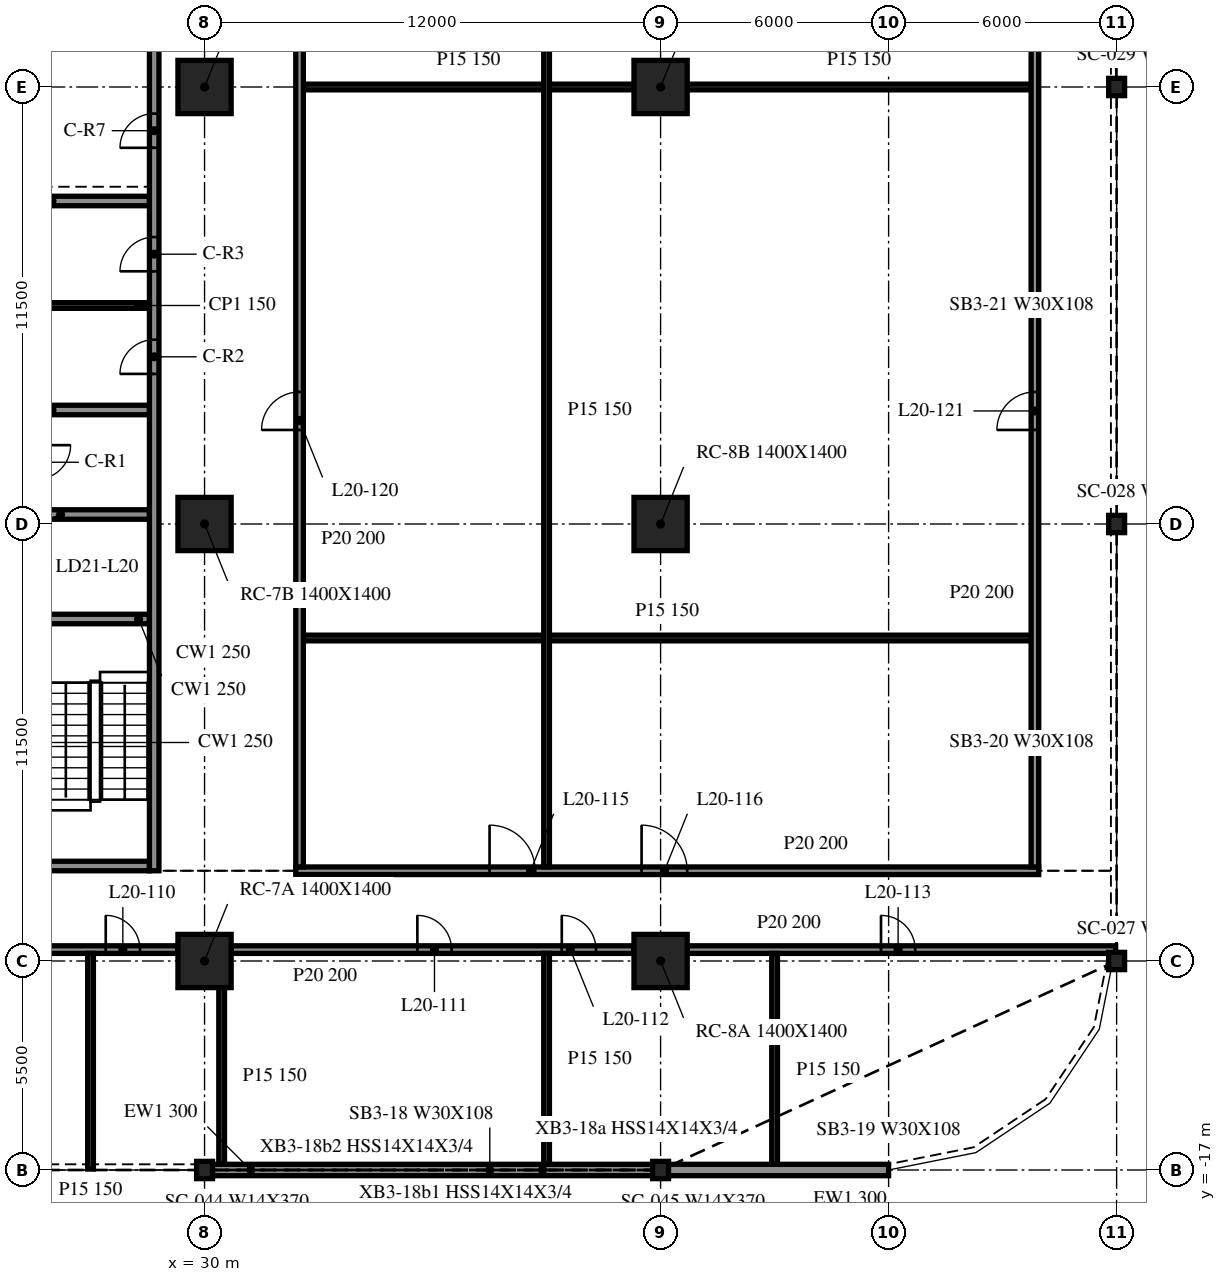
"""IFC4 building model, lengths in metres.
Left out: names, types, materials, properties, quantities, classifications, styles, units other than length and angle.
Written with IfcOpenShell. Run it as: python <this file> out.ifc"""

import sys

from ifc_helpers import new_model, si_unit, direction, frame, frame_2d, origin, origin_2d, place, context, subcontext, project, spatial, rectangle, i_section, extrude, element, fill, save


model = new_model("IFC4")
c1 = context("Model", 3, precision=1e-05, world=origin(), true_north=direction((0.0, 1.0)))
c2 = subcontext(c1, "Body", "Model", "MODEL_VIEW")
j1 = project(units=[si_unit("LENGTHUNIT", "METRE"), si_unit("PLANEANGLEUNIT", "RADIAN")], contexts=[c1])
p1 = place(None, origin())
s1 = spatial("IfcSite", under=j1, at=p1, CompositionType="ELEMENT")
p2 = place(p1, origin())
s2 = spatial("IfcBuilding", under=s1, at=p2, CompositionType="ELEMENT")
p3 = place(p2, frame((0.0, 0.0, 88.9)))
s3 = spatial("IfcBuildingStorey", under=s2, at=p3, CompositionType="ELEMENT", Elevation=88.9)
for number, where, z_axis, x_axis in (
    (1, (30.0, -11.5, -0.34), (0.0, 0.0, 1.0), (1.0, 0.0, 0.0)),
    (2, (30.0, 0.0, -0.34), (0.0, 0.0, 1.0), (1.0, 0.0, 0.0)),
    (3, (30.0, 11.5, -0.34), (0.0, 0.0, 1.0), (1.0, 0.0, 0.0)),
    (4, (42.0, -11.5, -0.34), (0.0, 0.0, 1.0), (1.0, 0.0, 0.0)),
    (5, (42.0, 0.0, -0.34), (0.0, 0.0, 1.0), (1.0, 0.0, 0.0)),
    (6, (42.0, 11.5, -0.34), (0.0, 0.0, 1.0), (1.0, 0.0, 0.0)),
):
    element("IfcColumn", number, at=place(p3, frame(where, z_axis=z_axis, x_axis=x_axis)), inside=s3, PredefinedType="COLUMN", context=c2, shape_type="SweptSolid", body=[
        extrude(rectangle(XDim=1.4, YDim=1.4, at=origin_2d()), origin(), (0.0, 0.0, 1.0), 4.1),
    ])
for number, where, z_axis, x_axis in (
    (7, (30.0, -17.0, -0.34), (0.0, 0.0, 1.0), (1.0, 0.0, 0.0)),
    (8, (42.0, -17.0, -0.34), (0.0, 0.0, 1.0), (1.0, 0.0, 0.0)),
    (9, (54.0, -11.5, -0.34), (0.0, 0.0, 1.0), (1.0, 0.0, 0.0)),
    (10, (54.0, 0.0, -0.34), (0.0, 0.0, 1.0), (1.0, 0.0, 0.0)),
    (11, (54.0, 11.5, -0.34), (0.0, 0.0, 1.0), (1.0, 0.0, 0.0)),
):
    element("IfcColumn", number, at=place(p3, frame(where, z_axis=z_axis, x_axis=x_axis)), inside=s3, PredefinedType="COLUMN", context=c2, shape_type="SweptSolid", body=[
        extrude(i_section(OverallWidth=0.419, OverallDepth=0.455, WebThickness=0.042, FlangeThickness=0.068, at=origin_2d()), origin(), (0.0, 0.0, 1.0), 4.1),
    ])
p4 = place(p3, frame((30.021, -17.0, 0.0), z_axis=(0.0, 0.0, 1.0), x_axis=(1.0, 0.0, 0.0)))
e12 = element("IfcWall", 12, at=p4, inside=s3, PredefinedType="NOTDEFINED", context=c2, shape_type="SweptSolid", body=[
    extrude(rectangle(XDim=11.958, YDim=0.3, at=frame_2d((5.979, 0.0))), origin(), (0.0, 0.0, 1.0), 3.003),
])
p5 = place(p3, frame((42.021, -17.0, 0.0), z_axis=(0.0, 0.0, 1.0), x_axis=(1.0, 0.0, 0.0)))
e13 = element("IfcWall", 13, at=p5, inside=s3, PredefinedType="NOTDEFINED", context=c2, shape_type="SweptSolid", body=[
    extrude(rectangle(XDim=5.979, YDim=0.3, at=frame_2d((2.99, 0.0))), origin(), (0.0, 0.0, 1.0), 3.003),
])
p6 = place(p3, frame((28.675, -9.125, 0.0), z_axis=(0.0, 0.0, 1.0), x_axis=(0.0, 1.0, 0.0)))
e14 = element("IfcWall", 14, at=p6, inside=s3, PredefinedType="SOLIDWALL", context=c2, shape_type="SweptSolid", body=[
    extrude(rectangle(XDim=24.25, YDim=0.25, at=frame_2d((12.125, 0.0))), origin(), (0.0, 0.0, 1.0), 3.76),
])
p7 = place(p6, frame((13.075, 0.0, 0.0)))
e15 = element("IfcOpeningElement", 15, at=p7, cuts=e14, PredefinedType="OPENING", context=c2, shape_type="SweptSolid", body=[
    extrude(rectangle(XDim=0.9, YDim=2.1, at=frame_2d((0.45, 1.05))), frame((0.0, 0.135, 0.0), z_axis=(0.0, -1.0, 0.0), x_axis=(1.0, 0.0, 0.0)), (0.0, 0.0, 1.0), 0.27),
])
p8 = place(p6, frame((15.775, 0.0, 0.0)))
e16 = element("IfcOpeningElement", 16, at=p8, cuts=e14, PredefinedType="OPENING", context=c2, shape_type="SweptSolid", body=[
    extrude(rectangle(XDim=0.9, YDim=2.1, at=frame_2d((0.45, 1.05))), frame((0.0, 0.135, 0.0), z_axis=(0.0, -1.0, 0.0), x_axis=(1.0, 0.0, 0.0)), (0.0, 0.0, 1.0), 0.27),
])
p9 = place(p6, frame((19.025, 0.0, 0.0)))
e17 = element("IfcOpeningElement", 17, at=p9, cuts=e14, PredefinedType="OPENING", context=c2, shape_type="SweptSolid", body=[
    extrude(rectangle(XDim=0.9, YDim=2.1, at=frame_2d((0.45, 1.05))), frame((0.0, 0.135, 0.0), z_axis=(0.0, -1.0, 0.0), x_axis=(1.0, 0.0, 0.0)), (0.0, 0.0, 1.0), 0.27),
])
p10 = place(p6, frame((22.587, 0.0, 0.0)))
e18 = element("IfcOpeningElement", 18, at=p10, cuts=e14, PredefinedType="OPENING", context=c2, shape_type="SweptSolid", body=[
    extrude(rectangle(XDim=0.9, YDim=2.1, at=frame_2d((0.45, 1.05))), frame((0.0, 0.135, 0.0), z_axis=(0.0, -1.0, 0.0), x_axis=(1.0, 0.0, 0.0)), (0.0, 0.0, 1.0), 0.27),
])
p11 = place(p3, frame((28.55, -9.0, 0.0), z_axis=(0.0, 0.0, 1.0), x_axis=(-1.0, 0.0, 0.0)))
e19 = element("IfcWall", 19, at=p11, inside=s3, PredefinedType="SOLIDWALL", context=c2, shape_type="SweptSolid", body=[
    extrude(rectangle(XDim=9.1, YDim=0.25, at=frame_2d((4.55, 0.0))), origin(), (0.0, 0.0, 1.0), 3.76),
])
p12 = place(p11, frame((3.65, 0.0, 0.0)))
e20 = element("IfcOpeningElement", 20, at=p12, cuts=e19, PredefinedType="OPENING", context=c2, shape_type="SweptSolid", body=[
    extrude(rectangle(XDim=1.8, YDim=2.1, at=frame_2d((0.9, 1.05))), frame((0.0, 0.135, 0.0), z_axis=(0.0, -1.0, 0.0), x_axis=(1.0, 0.0, 0.0)), (0.0, 0.0, 1.0), 0.27),
])
for number, where, z_axis, x_axis in (
    (21, (25.7, -2.5, 0.0), (0.0, 0.0, 1.0), (1.0, 0.0, 0.0)),
    (22, (25.7, 0.25, 0.0), (0.0, 0.0, 1.0), (1.0, 0.0, 0.0)),
    (23, (25.7, 3.0, 0.0), (0.0, 0.0, 1.0), (1.0, 0.0, 0.0)),
    (24, (25.7, 8.5, 0.0), (0.0, 0.0, 1.0), (1.0, 0.0, 0.0)),
):
    element("IfcWall", number, at=place(p3, frame(where, z_axis=z_axis, x_axis=x_axis)), inside=s3, PredefinedType="SOLIDWALL", context=c2, shape_type="SweptSolid", body=[
        extrude(rectangle(XDim=2.85, YDim=0.25, at=frame_2d((1.425, 0.0))), origin(), (0.0, 0.0, 1.0), 3.76),
    ])
p13 = place(p3, frame((25.7, 5.75, 0.0), z_axis=(0.0, 0.0, 1.0), x_axis=(1.0, 0.0, 0.0)))
e25 = element("IfcWall", 25, at=p13, inside=s3, PredefinedType="PARTITIONING", context=c2, shape_type="SweptSolid", body=[
    extrude(rectangle(XDim=2.85, YDim=0.15, at=frame_2d((1.425, 0.0))), origin(), (0.0, 0.0, 1.0), 3.76),
])
p14 = place(p3, frame((18.7, -11.2, 0.0), z_axis=(0.0, 0.0, 1.0), x_axis=(1.0, 0.0, 0.0)))
e26 = element("IfcWall", 26, at=p14, inside=s3, PredefinedType="PARTITIONING", context=c2, shape_type="SweptSolid", body=[
    extrude(rectangle(XDim=10.6, YDim=0.2, at=frame_2d((5.3, 0.0))), origin(), (0.0, 0.0, 1.0), 3.76),
])
p15 = place(p14, frame((4.9, 0.0, 0.0)))
e27 = element("IfcOpeningElement", 27, at=p15, cuts=e26, PredefinedType="OPENING", context=c2, shape_type="SweptSolid", body=[
    extrude(rectangle(XDim=0.9, YDim=2.1, at=frame_2d((0.45, 1.05))), frame((0.0, 0.11, 0.0), z_axis=(0.0, -1.0, 0.0), x_axis=(1.0, 0.0, 0.0)), (0.0, 0.0, 1.0), 0.22),
])
p16 = place(p14, frame((8.7, 0.0, 0.0)))
e28 = element("IfcOpeningElement", 28, at=p16, cuts=e26, PredefinedType="OPENING", context=c2, shape_type="SweptSolid", body=[
    extrude(rectangle(XDim=0.9, YDim=2.1, at=frame_2d((0.45, 1.05))), frame((0.0, 0.11, 0.0), z_axis=(0.0, -1.0, 0.0), x_axis=(1.0, 0.0, 0.0)), (0.0, 0.0, 1.0), 0.22),
])
p17 = place(p3, frame((30.7, -11.2, 0.0), z_axis=(0.0, 0.0, 1.0), x_axis=(1.0, 0.0, 0.0)))
e29 = element("IfcWall", 29, at=p17, inside=s3, PredefinedType="PARTITIONING", context=c2, shape_type="SweptSolid", body=[
    extrude(rectangle(XDim=10.6, YDim=0.2, at=frame_2d((5.3, 0.0))), origin(), (0.0, 0.0, 1.0), 3.76),
])
p18 = place(p17, frame((4.9, 0.0, 0.0)))
e30 = element("IfcOpeningElement", 30, at=p18, cuts=e29, PredefinedType="OPENING", context=c2, shape_type="SweptSolid", body=[
    extrude(rectangle(XDim=0.9, YDim=2.1, at=frame_2d((0.45, 1.05))), frame((0.0, 0.11, 0.0), z_axis=(0.0, -1.0, 0.0), x_axis=(1.0, 0.0, 0.0)), (0.0, 0.0, 1.0), 0.22),
])
p19 = place(p17, frame((8.7, 0.0, 0.0)))
e31 = element("IfcOpeningElement", 31, at=p19, cuts=e29, PredefinedType="OPENING", context=c2, shape_type="SweptSolid", body=[
    extrude(rectangle(XDim=0.9, YDim=2.1, at=frame_2d((0.45, 1.05))), frame((0.0, 0.11, 0.0), z_axis=(0.0, -1.0, 0.0), x_axis=(1.0, 0.0, 0.0)), (0.0, 0.0, 1.0), 0.22),
])
p20 = place(p3, frame((42.7, -11.2, 0.0), z_axis=(0.0, 0.0, 1.0), x_axis=(1.0, 0.0, 0.0)))
e32 = element("IfcWall", 32, at=p20, inside=s3, PredefinedType="PARTITIONING", context=c2, shape_type="SweptSolid", body=[
    extrude(rectangle(XDim=11.275, YDim=0.2, at=frame_2d((5.638, 0.0))), origin(), (0.0, 0.0, 1.0), 3.76),
])
p21 = place(p20, frame((5.1, 0.0, 0.0)))
e33 = element("IfcOpeningElement", 33, at=p21, cuts=e32, PredefinedType="OPENING", context=c2, shape_type="SweptSolid", body=[
    extrude(rectangle(XDim=0.9, YDim=2.1, at=frame_2d((0.45, 1.05))), frame((0.0, 0.11, 0.0), z_axis=(0.0, -1.0, 0.0), x_axis=(1.0, 0.0, 0.0)), (0.0, 0.0, 1.0), 0.22),
])
p22 = place(p3, frame((32.4, -9.125, 0.0), z_axis=(0.0, 0.0, 1.0), x_axis=(1.0, 0.0, 0.0)))
e34 = element("IfcWall", 34, at=p22, inside=s3, PredefinedType="PARTITIONING", context=c2, shape_type="SweptSolid", body=[
    extrude(rectangle(XDim=19.55, YDim=0.2, at=frame_2d((9.775, 0.0))), origin(), (0.0, 0.0, 1.0), 3.76),
])
p23 = place(p22, frame((5.1, 0.0, 0.0)))
e35 = element("IfcOpeningElement", 35, at=p23, cuts=e34, PredefinedType="OPENING", context=c2, shape_type="SweptSolid", body=[
    extrude(rectangle(XDim=1.2, YDim=2.1, at=frame_2d((0.6, 1.05))), frame((0.0, 0.11, 0.0), z_axis=(0.0, -1.0, 0.0), x_axis=(1.0, 0.0, 0.0)), (0.0, 0.0, 1.0), 0.22),
])
p24 = place(p22, frame((9.1, 0.0, 0.0)))
e36 = element("IfcOpeningElement", 36, at=p24, cuts=e34, PredefinedType="OPENING", context=c2, shape_type="SweptSolid", body=[
    extrude(rectangle(XDim=1.2, YDim=2.1, at=frame_2d((0.6, 1.05))), frame((0.0, 0.11, 0.0), z_axis=(0.0, -1.0, 0.0), x_axis=(1.0, 0.0, 0.0)), (0.0, 0.0, 1.0), 0.22),
])
p25 = place(p3, frame((32.6, -3.0, 0.0), z_axis=(0.0, 0.0, 1.0), x_axis=(1.0, 0.0, 0.0)))
e37 = element("IfcWall", 37, at=p25, inside=s3, PredefinedType="PARTITIONING", context=c2, shape_type="SweptSolid", body=[
    extrude(rectangle(XDim=19.15, YDim=0.15, at=frame_2d((9.575, 0.0))), origin(), (0.0, 0.0, 1.0), 3.76),
])
p26 = place(p3, frame((32.6, 11.5, 0.0), z_axis=(0.0, 0.0, 1.0), x_axis=(1.0, 0.0, 0.0)))
e38 = element("IfcWall", 38, at=p26, inside=s3, PredefinedType="PARTITIONING", context=c2, shape_type="SweptSolid", body=[
    extrude(rectangle(XDim=8.7, YDim=0.15, at=frame_2d((4.35, 0.0))), origin(), (0.0, 0.0, 1.0), 3.76),
])
p27 = place(p3, frame((42.7, 11.5, 0.0), z_axis=(0.0, 0.0, 1.0), x_axis=(1.0, 0.0, 0.0)))
e39 = element("IfcWall", 39, at=p27, inside=s3, PredefinedType="PARTITIONING", context=c2, shape_type="SweptSolid", body=[
    extrude(rectangle(XDim=9.05, YDim=0.15, at=frame_2d((4.525, 0.0))), origin(), (0.0, 0.0, 1.0), 3.76),
])
p28 = place(p3, frame((27.0, -16.975, 0.0), z_axis=(0.0, 0.0, 1.0), x_axis=(0.0, 1.0, 0.0)))
e40 = element("IfcWall", 40, at=p28, inside=s3, PredefinedType="PARTITIONING", context=c2, shape_type="SweptSolid", body=[
    extrude(rectangle(XDim=5.675, YDim=0.15, at=frame_2d((2.837, 0.0))), origin(), (0.0, 0.0, 1.0), 3.76),
])
p29 = place(p3, frame((30.45, -16.85, 0.0), z_axis=(0.0, 0.0, 1.0), x_axis=(0.0, 1.0, 0.0)))
e41 = element("IfcWall", 41, at=p29, inside=s3, PredefinedType="PARTITIONING", context=c2, shape_type="SweptSolid", body=[
    extrude(rectangle(XDim=4.65, YDim=0.15, at=frame_2d((2.325, 0.0))), origin(), (0.0, 0.0, 1.0), 3.76),
])
p30 = place(p3, frame((32.5, -9.025, 0.0), z_axis=(0.0, 0.0, 1.0), x_axis=(0.0, 1.0, 0.0)))
e42 = element("IfcWall", 42, at=p30, inside=s3, PredefinedType="PARTITIONING", context=c2, shape_type="SweptSolid", body=[
    extrude(rectangle(XDim=24.05, YDim=0.2, at=frame_2d((12.025, 0.0))), origin(), (0.0, 0.0, 1.0), 3.76),
])
p31 = place(p30, frame((11.5, 0.0, 0.0)))
e43 = element("IfcOpeningElement", 43, at=p31, cuts=e42, PredefinedType="OPENING", context=c2, shape_type="SweptSolid", body=[
    extrude(rectangle(XDim=1.0, YDim=2.1, at=frame_2d((0.5, 1.05))), frame((0.0, 0.11, 0.0), z_axis=(0.0, -1.0, 0.0), x_axis=(1.0, 0.0, 0.0)), (0.0, 0.0, 1.0), 0.22),
])
p32 = place(p3, frame((39.0, -16.85, 0.0), z_axis=(0.0, 0.0, 1.0), x_axis=(0.0, 1.0, 0.0)))
e44 = element("IfcWall", 44, at=p32, inside=s3, PredefinedType="PARTITIONING", context=c2, shape_type="SweptSolid", body=[
    extrude(rectangle(XDim=5.55, YDim=0.15, at=frame_2d((2.775, 0.0))), origin(), (0.0, 0.0, 1.0), 3.76),
])
p33 = place(p3, frame((39.0, -9.025, 0.0), z_axis=(0.0, 0.0, 1.0), x_axis=(0.0, 1.0, 0.0)))
e45 = element("IfcWall", 45, at=p33, inside=s3, PredefinedType="PARTITIONING", context=c2, shape_type="SweptSolid", body=[
    extrude(rectangle(XDim=24.05, YDim=0.15, at=frame_2d((12.025, 0.0))), origin(), (0.0, 0.0, 1.0), 3.76),
])
p34 = place(p3, frame((45.0, -16.85, 0.0), z_axis=(0.0, 0.0, 1.0), x_axis=(0.0, 1.0, 0.0)))
e46 = element("IfcWall", 46, at=p34, inside=s3, PredefinedType="PARTITIONING", context=c2, shape_type="SweptSolid", body=[
    extrude(rectangle(XDim=5.55, YDim=0.15, at=frame_2d((2.775, 0.0))), origin(), (0.0, 0.0, 1.0), 3.76),
])
p35 = place(p3, frame((51.85, -9.025, 0.0), z_axis=(0.0, 0.0, 1.0), x_axis=(0.0, 1.0, 0.0)))
e47 = element("IfcWall", 47, at=p35, inside=s3, PredefinedType="PARTITIONING", context=c2, shape_type="SweptSolid", body=[
    extrude(rectangle(XDim=24.05, YDim=0.2, at=frame_2d((12.025, 0.0))), origin(), (0.0, 0.0, 1.0), 3.76),
])
p36 = place(p35, frame((11.5, 0.0, 0.0)))
e48 = element("IfcOpeningElement", 48, at=p36, cuts=e47, PredefinedType="OPENING", context=c2, shape_type="SweptSolid", body=[
    extrude(rectangle(XDim=1.0, YDim=2.1, at=frame_2d((0.5, 1.05))), frame((0.0, 0.11, 0.0), z_axis=(0.0, -1.0, 0.0), x_axis=(1.0, 0.0, 0.0)), (0.0, 0.0, 1.0), 0.22),
])
p37 = place(p7, origin())
e49 = element("IfcDoor", 49, at=p37, inside=s3, OperationType="SINGLE_SWING_RIGHT", PredefinedType="DOOR", context=c2, shape_type="SweptSolid", body=[
    extrude(rectangle(XDim=0.9, YDim=2.1, at=frame_2d((0.45, 1.05))), frame((0.0, 0.025, 0.0), z_axis=(0.0, -1.0, 0.0), x_axis=(1.0, 0.0, 0.0)), (0.0, 0.0, 1.0), 0.05),
])
fill(e15, e49)
p38 = place(p8, origin())
e50 = element("IfcDoor", 50, at=p38, inside=s3, OperationType="SINGLE_SWING_LEFT", PredefinedType="DOOR", context=c2, shape_type="SweptSolid", body=[
    extrude(rectangle(XDim=0.9, YDim=2.1, at=frame_2d((0.45, 1.05))), frame((0.0, 0.025, 0.0), z_axis=(0.0, -1.0, 0.0), x_axis=(1.0, 0.0, 0.0)), (0.0, 0.0, 1.0), 0.05),
])
fill(e16, e50)
p39 = place(p9, origin())
e51 = element("IfcDoor", 51, at=p39, inside=s3, OperationType="SINGLE_SWING_LEFT", PredefinedType="DOOR", context=c2, shape_type="SweptSolid", body=[
    extrude(rectangle(XDim=0.9, YDim=2.1, at=frame_2d((0.45, 1.05))), frame((0.0, 0.025, 0.0), z_axis=(0.0, -1.0, 0.0), x_axis=(1.0, 0.0, 0.0)), (0.0, 0.0, 1.0), 0.05),
])
fill(e17, e51)
p40 = place(p16, origin())
e52 = element("IfcDoor", 52, at=p40, inside=s3, OperationType="SINGLE_SWING_LEFT", PredefinedType="DOOR", context=c2, shape_type="SweptSolid", body=[
    extrude(rectangle(XDim=0.9, YDim=2.1, at=frame_2d((0.45, 1.05))), frame((0.0, 0.025, 0.0), z_axis=(0.0, -1.0, 0.0), x_axis=(1.0, 0.0, 0.0)), (0.0, 0.0, 1.0), 0.05),
])
fill(e28, e52)
p41 = place(p18, origin())
e53 = element("IfcDoor", 53, at=p41, inside=s3, OperationType="SINGLE_SWING_LEFT", PredefinedType="DOOR", context=c2, shape_type="SweptSolid", body=[
    extrude(rectangle(XDim=0.9, YDim=2.1, at=frame_2d((0.45, 1.05))), frame((0.0, 0.025, 0.0), z_axis=(0.0, -1.0, 0.0), x_axis=(1.0, 0.0, 0.0)), (0.0, 0.0, 1.0), 0.05),
])
fill(e30, e53)
p42 = place(p19, origin())
e54 = element("IfcDoor", 54, at=p42, inside=s3, OperationType="SINGLE_SWING_LEFT", PredefinedType="DOOR", context=c2, shape_type="SweptSolid", body=[
    extrude(rectangle(XDim=0.9, YDim=2.1, at=frame_2d((0.45, 1.05))), frame((0.0, 0.025, 0.0), z_axis=(0.0, -1.0, 0.0), x_axis=(1.0, 0.0, 0.0)), (0.0, 0.0, 1.0), 0.05),
])
fill(e31, e54)
p43 = place(p21, origin())
e55 = element("IfcDoor", 55, at=p43, inside=s3, OperationType="SINGLE_SWING_RIGHT", PredefinedType="DOOR", context=c2, shape_type="SweptSolid", body=[
    extrude(rectangle(XDim=0.9, YDim=2.1, at=frame_2d((0.45, 1.05))), frame((0.0, 0.025, 0.0), z_axis=(0.0, -1.0, 0.0), x_axis=(1.0, 0.0, 0.0)), (0.0, 0.0, 1.0), 0.05),
])
fill(e33, e55)
p44 = place(p23, origin())
e56 = element("IfcDoor", 56, at=p44, inside=s3, OperationType="SINGLE_SWING_LEFT", PredefinedType="DOOR", context=c2, shape_type="SweptSolid", body=[
    extrude(rectangle(XDim=1.2, YDim=2.1, at=frame_2d((0.6, 1.05))), frame((0.0, 0.025, 0.0), z_axis=(0.0, -1.0, 0.0), x_axis=(1.0, 0.0, 0.0)), (0.0, 0.0, 1.0), 0.05),
])
fill(e35, e56)
p45 = place(p24, origin())
e57 = element("IfcDoor", 57, at=p45, inside=s3, OperationType="SINGLE_SWING_LEFT", PredefinedType="DOOR", context=c2, shape_type="SweptSolid", body=[
    extrude(rectangle(XDim=1.2, YDim=2.1, at=frame_2d((0.6, 1.05))), frame((0.0, 0.025, 0.0), z_axis=(0.0, -1.0, 0.0), x_axis=(1.0, 0.0, 0.0)), (0.0, 0.0, 1.0), 0.05),
])
fill(e36, e57)
p46 = place(p31, origin())
e58 = element("IfcDoor", 58, at=p46, inside=s3, OperationType="SINGLE_SWING_RIGHT", PredefinedType="DOOR", context=c2, shape_type="SweptSolid", body=[
    extrude(rectangle(XDim=1.0, YDim=2.1, at=frame_2d((0.5, 1.05))), frame((0.0, 0.025, 0.0), z_axis=(0.0, -1.0, 0.0), x_axis=(1.0, 0.0, 0.0)), (0.0, 0.0, 1.0), 0.05),
])
fill(e43, e58)
p47 = place(p36, origin())
e59 = element("IfcDoor", 59, at=p47, inside=s3, OperationType="SINGLE_SWING_LEFT", PredefinedType="DOOR", context=c2, shape_type="SweptSolid", body=[
    extrude(rectangle(XDim=1.0, YDim=2.1, at=frame_2d((0.5, 1.05))), frame((0.0, 0.025, 0.0), z_axis=(0.0, -1.0, 0.0), x_axis=(1.0, 0.0, 0.0)), (0.0, 0.0, 1.0), 0.05),
])
fill(e48, e59)
save(model, sys.argv[1])
